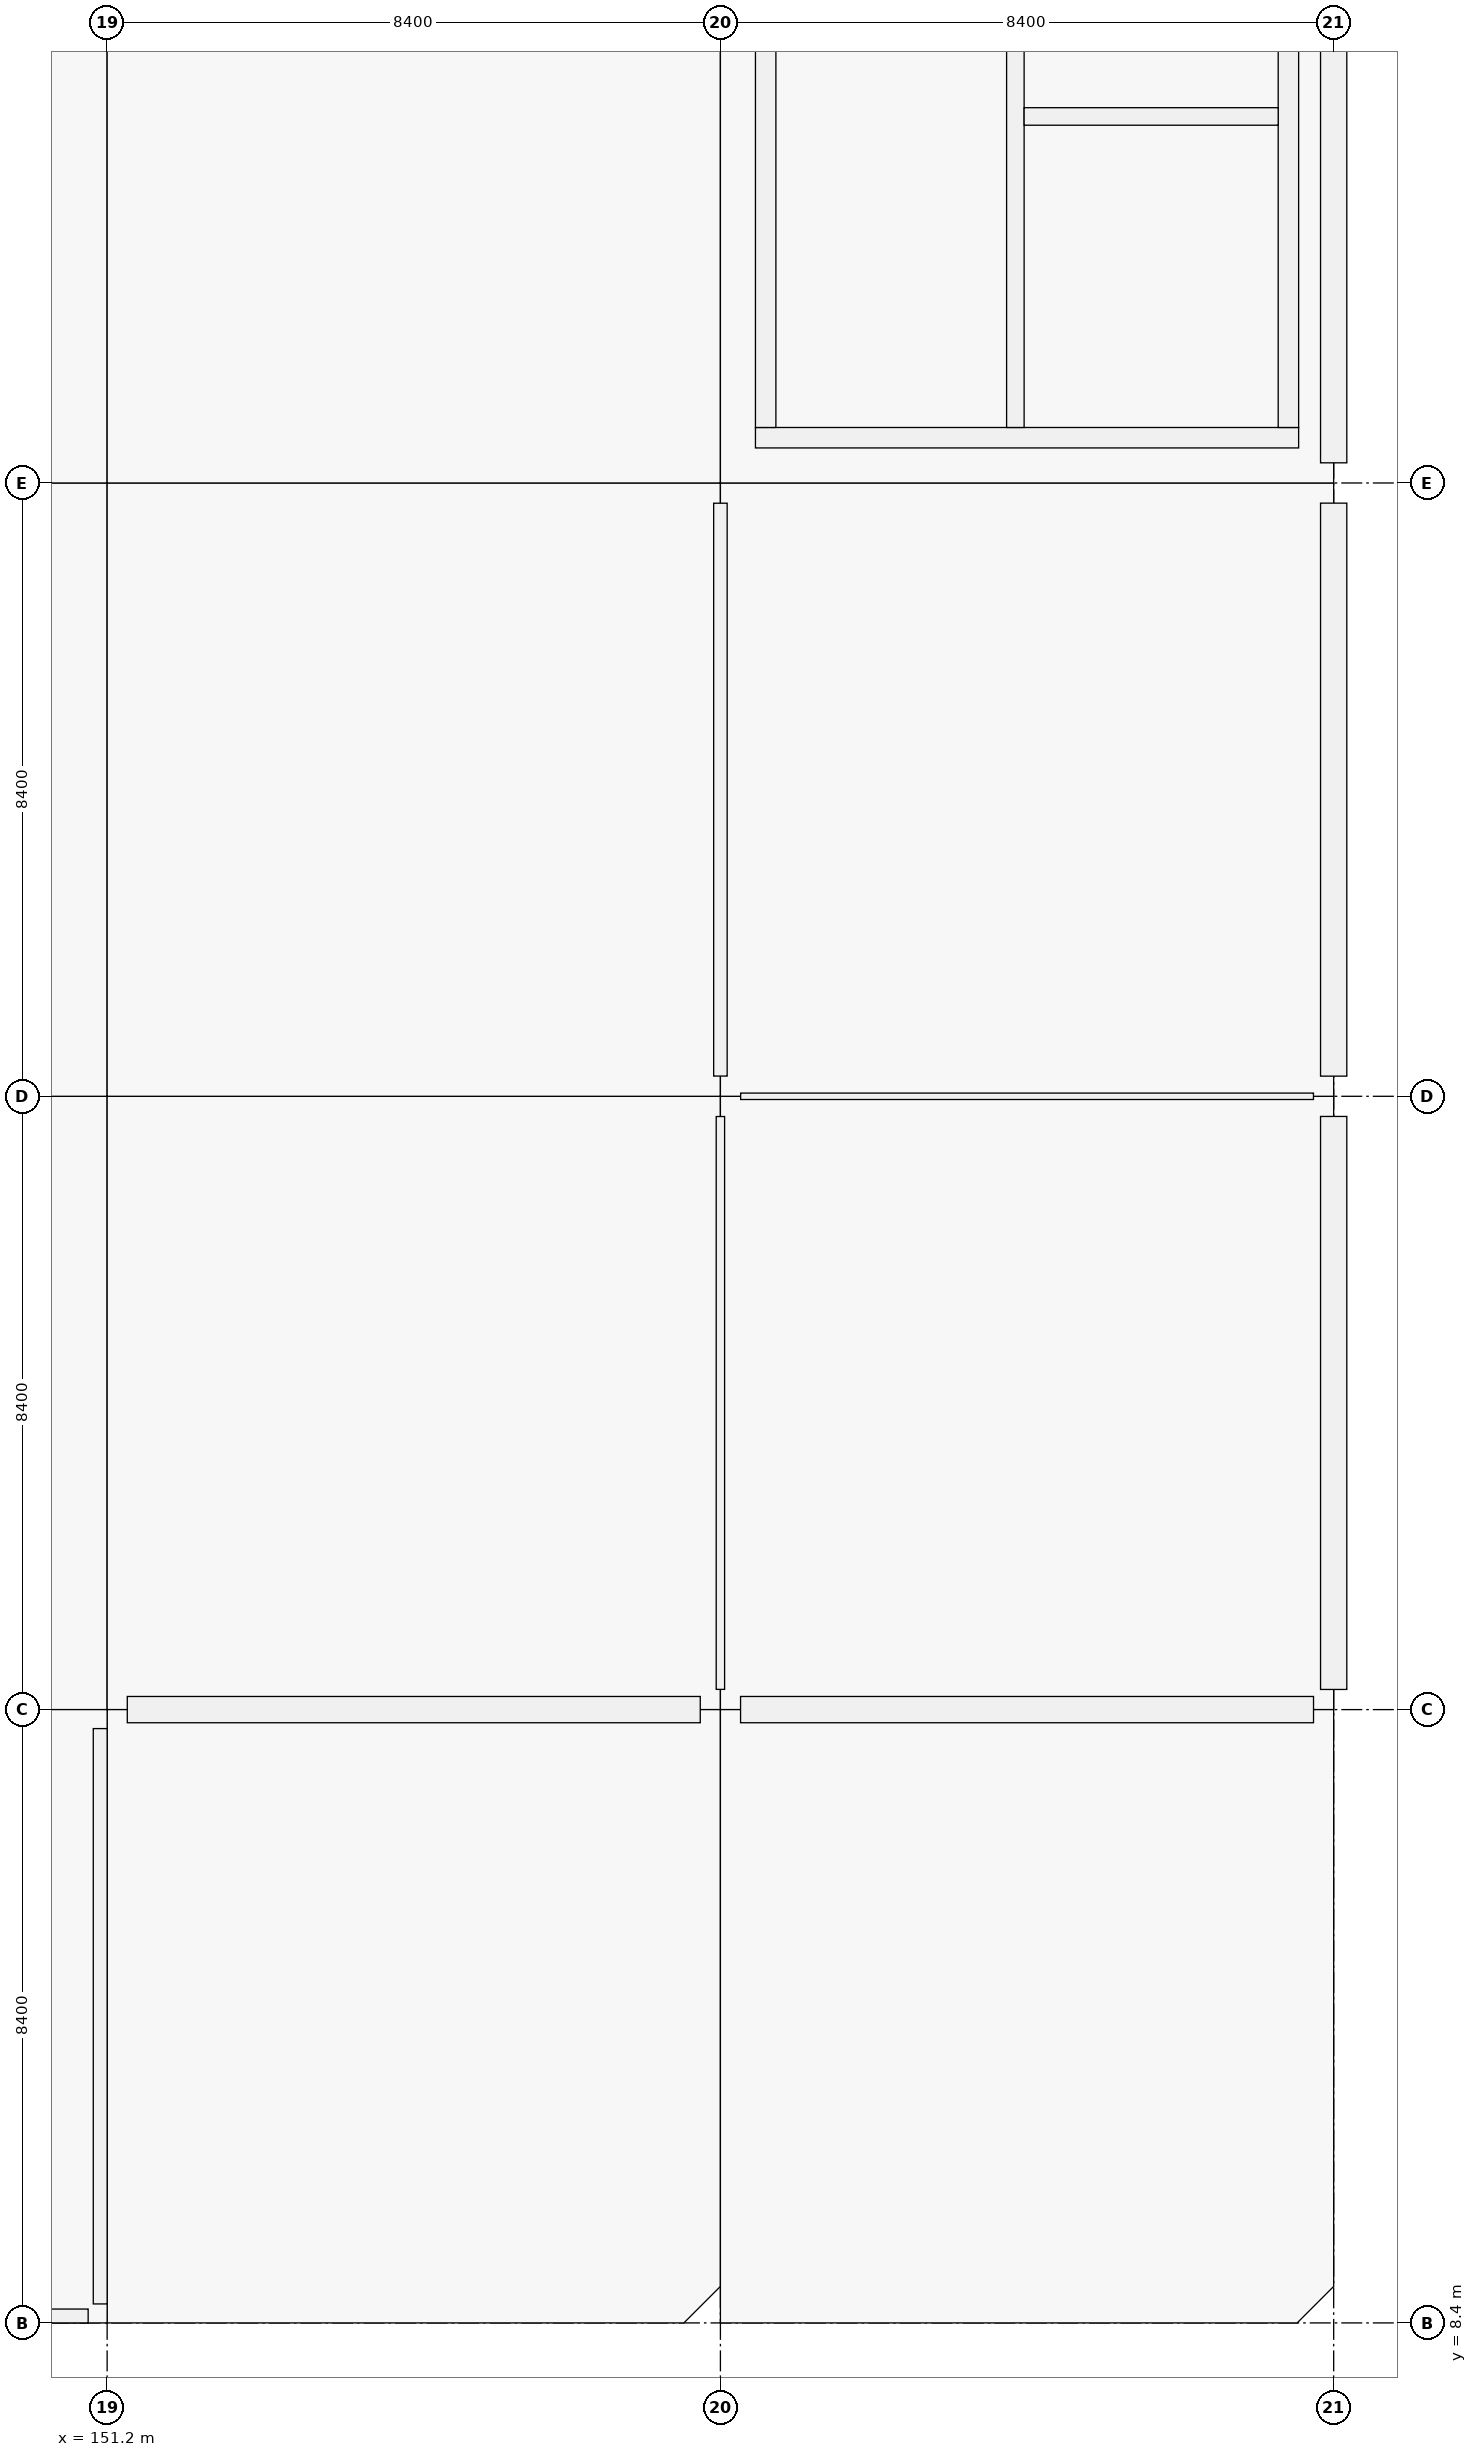
"""IFC4 building model, lengths in metres.
Left out: names, types, materials, properties, quantities, classifications, styles, units other than length and angle.
Written with IfcOpenShell. Run it as: python <this file> out.ifc"""

import sys

from ifc_helpers import new_model, si_unit, direction, frame, frame_2d, origin, origin_2d, place, context, subcontext, project, spatial, rectangle, i_section, extrude, element, fill, save


model = new_model("IFC4")
c1 = context("Model", 3, precision=1e-05, world=origin(), true_north=direction((0.0, 1.0)))
c2 = subcontext(c1, "Body", "Model", "MODEL_VIEW")
j1 = project(units=[si_unit("LENGTHUNIT", "METRE"), si_unit("PLANEANGLEUNIT", "RADIAN")], contexts=[c1])
p1 = place(None, origin())
s1 = spatial("IfcSite", under=j1, at=p1, CompositionType="ELEMENT")
p2 = place(p1, origin())
s2 = spatial("IfcBuilding", under=s1, at=p2, CompositionType="ELEMENT")
p3 = place(p2, frame((0.0, 0.0, 14.76)))
s3 = spatial("IfcBuildingStorey", under=s2, at=p3, CompositionType="ELEMENT", Elevation=14.76)
for number, where, z_axis, x_axis in (
    (1, (151.2, 16.8, 0.0), (0.0, 0.0, 1.0), (1.0, 0.0, 0.0)),
    (2, (151.2, 25.2, 0.0), (0.0, 0.0, 1.0), (1.0, 0.0, 0.0)),
    (3, (151.2, 33.6, 0.0), (0.0, 0.0, 1.0), (1.0, 0.0, 0.0)),
    (4, (159.6, 16.8, 0.0), (0.0, 0.0, 1.0), (1.0, 0.0, 0.0)),
    (5, (159.6, 25.2, 0.0), (0.0, 0.0, 1.0), (1.0, 0.0, 0.0)),
    (6, (159.6, 33.6, 0.0), (0.0, 0.0, 1.0), (1.0, 0.0, 0.0)),
    (7, (168.0, 16.8, 0.0), (0.0, 0.0, 1.0), (1.0, 0.0, 0.0)),
    (8, (168.0, 25.2, 0.0), (0.0, 0.0, 1.0), (1.0, 0.0, 0.0)),
    (9, (168.0, 33.6, 0.0), (0.0, 0.0, 1.0), (1.0, 0.0, 0.0)),
):
    element("IfcColumn", number, at=place(p3, frame(where, z_axis=z_axis, x_axis=x_axis)), inside=s3, PredefinedType="COLUMN", context=c2, shape_type="SweptSolid", body=[
        extrude(rectangle(XDim=0.55, YDim=0.55, at=origin_2d()), origin(), (0.0, 0.0, 1.0), 4.17),
    ])
for number, where, z_axis, x_axis in (
    (10, (151.2, 16.8, 4.17), (0.0, 0.0, 1.0), (1.0, 0.0, 0.0)),
    (11, (159.6, 16.8, 4.17), (0.0, 0.0, 1.0), (1.0, 0.0, 0.0)),
    (12, (167.86, 16.8, 4.17), (0.0, 0.0, 1.0), (1.0, 0.0, 0.0)),
    (13, (151.2, 25.2, 4.17), (0.0, 0.0, 1.0), (1.0, 0.0, 0.0)),
    (14, (159.6, 25.2, 4.17), (0.0, 0.0, 1.0), (1.0, 0.0, 0.0)),
    (15, (167.86, 25.2, 4.17), (0.0, 0.0, 1.0), (1.0, 0.0, 0.0)),
    (16, (151.2, 33.6, 4.17), (0.0, 0.0, 1.0), (1.0, 0.0, 0.0)),
    (17, (159.6, 33.6, 4.17), (0.0, 0.0, 1.0), (1.0, 0.0, 0.0)),
    (18, (167.86, 33.6, 4.17), (0.0, 0.0, 1.0), (1.0, 0.0, 0.0)),
):
    element("IfcColumn", number, at=place(p3, frame(where, z_axis=z_axis, x_axis=x_axis)), inside=s3, PredefinedType="COLUMN", context=c2, shape_type="SweptSolid", body=[
        extrude(i_section(OverallWidth=0.254, OverallDepth=0.254, WebThickness=0.009, FlangeThickness=0.014, FilletRadius=0.013, at=origin_2d()), origin(), (0.0, 0.0, 1.0), 2.157),
    ])
p4 = place(p3, frame((159.324, 16.8, 0.0), z_axis=(0.0, 0.0, 1.0), x_axis=(-1.0, 0.0, 0.0)))
e19 = element("IfcWall", 19, at=p4, inside=s3, PredefinedType="SOLIDWALL", context=c2, shape_type="SweptSolid", body=[
    extrude(rectangle(XDim=7.848, YDim=0.36, at=frame_2d((3.924, 0.0))), origin(), (0.0, 0.0, 1.0), 3.37),
])
p5 = place(p4, frame((2.999, 0.0, 0.0)))
e20 = element("IfcOpeningElement", 20, at=p5, cuts=e19, PredefinedType="OPENING", context=c2, shape_type="SweptSolid", body=[
    extrude(rectangle(XDim=1.85, YDim=2.2, at=frame_2d((0.925, 1.1))), frame((0.0, 0.18, 0.0), z_axis=(0.0, -1.0, 0.0), x_axis=(1.0, 0.0, 0.0)), (0.0, 0.0, 1.0), 0.36),
])
p6 = place(p3, frame((167.724, 16.8, 0.0), z_axis=(0.0, 0.0, 1.0), x_axis=(-1.0, 0.0, 0.0)))
e21 = element("IfcWall", 21, at=p6, inside=s3, PredefinedType="SOLIDWALL", context=c2, shape_type="SweptSolid", body=[
    extrude(rectangle(XDim=7.848, YDim=0.36, at=frame_2d((3.924, 0.0))), origin(), (0.0, 0.0, 1.0), 3.37),
])
p7 = place(p6, frame((3.099, 0.0, 0.0)))
e22 = element("IfcOpeningElement", 22, at=p7, cuts=e21, PredefinedType="OPENING", context=c2, shape_type="SweptSolid", body=[
    extrude(rectangle(XDim=1.65, YDim=2.2, at=frame_2d((0.825, 1.1))), frame((0.0, 0.18, 0.0), z_axis=(0.0, -1.0, 0.0), x_axis=(1.0, 0.0, 0.0)), (0.0, 0.0, 1.0), 0.36),
])
p8 = place(p3, frame((168.0, 24.924, 0.0), z_axis=(0.0, 0.0, 1.0), x_axis=(0.0, -1.0, 0.0)))
e23 = element("IfcWall", 23, at=p8, inside=s3, PredefinedType="SOLIDWALL", context=c2, shape_type="SweptSolid", body=[
    extrude(rectangle(XDim=7.848, YDim=0.36, at=frame_2d((3.924, 0.0))), origin(), (0.0, 0.0, 1.0), 3.37),
])
p9 = place(p8, frame((2.824, 0.0, 0.9)))
e24 = element("IfcOpeningElement", 24, at=p9, cuts=e23, PredefinedType="OPENING", context=c2, shape_type="SweptSolid", body=[
    extrude(rectangle(XDim=2.2, YDim=1.75, at=frame_2d((1.1, 0.875))), frame((0.0, 0.18, 0.0), z_axis=(0.0, -1.0, 0.0), x_axis=(1.0, 0.0, 0.0)), (0.0, 0.0, 1.0), 0.36),
])
p10 = place(p3, frame((168.0, 33.324, 0.0), z_axis=(0.0, 0.0, 1.0), x_axis=(0.0, -1.0, 0.0)))
e25 = element("IfcWall", 25, at=p10, inside=s3, PredefinedType="SOLIDWALL", context=c2, shape_type="SweptSolid", body=[
    extrude(rectangle(XDim=7.848, YDim=0.36, at=frame_2d((3.924, 0.0))), origin(), (0.0, 0.0, 1.0), 3.37),
])
p11 = place(p10, frame((2.524, 0.0, 0.9)))
e26 = element("IfcOpeningElement", 26, at=p11, cuts=e25, PredefinedType="OPENING", context=c2, shape_type="SweptSolid", body=[
    extrude(rectangle(XDim=2.8, YDim=1.75, at=frame_2d((1.4, 0.875))), frame((0.0, 0.18, 0.0), z_axis=(0.0, -1.0, 0.0), x_axis=(1.0, 0.0, 0.0)), (0.0, 0.0, 1.0), 0.36),
])
p12 = place(p3, frame((168.0, 41.724, 0.0), z_axis=(0.0, 0.0, 1.0), x_axis=(0.0, -1.0, 0.0)))
e27 = element("IfcWall", 27, at=p12, inside=s3, PredefinedType="SOLIDWALL", context=c2, shape_type="SweptSolid", body=[
    extrude(rectangle(XDim=7.848, YDim=0.36, at=frame_2d((3.924, 0.0))), origin(), (0.0, 0.0, 1.0), 3.37),
])
p13 = place(p3, frame((150.94, 8.495, 0.0), z_axis=(0.0, 0.0, 1.0), x_axis=(-1.0, 0.0, 0.0)))
e28 = element("IfcWall", 28, at=p13, inside=s3, PredefinedType="PARAPET", context=c2, shape_type="SweptSolid", body=[
    extrude(rectangle(XDim=7.88, YDim=0.19, at=frame_2d((3.94, 0.0))), origin(), (0.0, 0.0, 1.0), 0.95),
])
p14 = place(p3, frame((151.105, 16.54, 0.0), z_axis=(0.0, 0.0, 1.0), x_axis=(0.0, -1.0, 0.0)))
e29 = element("IfcWall", 29, at=p14, inside=s3, PredefinedType="PARAPET", context=c2, shape_type="SweptSolid", body=[
    extrude(rectangle(XDim=7.88, YDim=0.19, at=frame_2d((3.94, 0.0))), origin(), (0.0, 0.0, 1.0), 0.95),
])
p15 = place(p3, frame((167.52, 34.22, 0.0), z_axis=(0.0, 0.0, 1.0), x_axis=(-1.0, 0.0, 0.0)))
e30 = element("IfcWall", 30, at=p15, inside=s3, PredefinedType="SHEAR", context=c2, shape_type="SweptSolid", body=[
    extrude(rectangle(XDim=7.44, YDim=0.28, at=frame_2d((3.72, 0.0))), origin(), (0.0, 0.0, 1.0), 4.07),
])
p16 = place(p15, frame((1.28, 0.0, 0.0)))
e31 = element("IfcOpeningElement", 31, at=p16, cuts=e30, PredefinedType="OPENING", context=c2, shape_type="SweptSolid", body=[
    extrude(rectangle(XDim=1.5, YDim=2.15, at=frame_2d((0.75, 1.075))), frame((0.0, 0.14, 0.0), z_axis=(0.0, -1.0, 0.0), x_axis=(1.0, 0.0, 0.0)), (0.0, 0.0, 1.0), 0.28),
])
for number, where, z_axis, x_axis in (
    (32, (160.22, 34.36, 0.0), (0.0, 0.0, 1.0), (0.0, 1.0, 0.0)),
    (33, (167.38, 41.24, 0.0), (0.0, 0.0, 1.0), (0.0, -1.0, 0.0)),
):
    element("IfcWall", number, at=place(p3, frame(where, z_axis=z_axis, x_axis=x_axis)), inside=s3, PredefinedType="SHEAR", context=c2, shape_type="SweptSolid", body=[
        extrude(rectangle(XDim=6.88, YDim=0.28, at=frame_2d((3.44, 0.0))), origin(), (0.0, 0.0, 1.0), 4.07),
    ])
p17 = place(p3, frame((163.64, 34.36, 0.0), z_axis=(0.0, 0.0, 1.0), x_axis=(0.0, 1.0, 0.0)))
e34 = element("IfcWall", 34, at=p17, inside=s3, PredefinedType="SHEAR", context=c2, shape_type="SweptSolid", body=[
    extrude(rectangle(XDim=6.88, YDim=0.24, at=frame_2d((3.44, 0.0))), origin(), (0.0, 0.0, 1.0), 4.07),
])
p18 = place(p17, frame((0.12, 0.0, 0.0)))
e35 = element("IfcOpeningElement", 35, at=p18, cuts=e34, PredefinedType="OPENING", context=c2, shape_type="SweptSolid", body=[
    extrude(rectangle(XDim=1.0, YDim=2.15, at=frame_2d((0.5, 1.075))), frame((0.0, 0.12, 0.0), z_axis=(0.0, -1.0, 0.0), x_axis=(1.0, 0.0, 0.0)), (0.0, 0.0, 1.0), 0.24),
])
p19 = place(p3, frame((163.76, 38.62, 0.0), z_axis=(0.0, 0.0, 1.0), x_axis=(1.0, 0.0, 0.0)))
e36 = element("IfcWall", 36, at=p19, inside=s3, PredefinedType="SHEAR", context=c2, shape_type="SweptSolid", body=[
    extrude(rectangle(XDim=3.48, YDim=0.24, at=frame_2d((1.74, 0.0))), origin(), (0.0, 0.0, 1.0), 4.07),
])
p20 = place(p19, frame((1.09, 0.0, 0.0)))
e37 = element("IfcOpeningElement", 37, at=p20, cuts=e36, PredefinedType="OPENING", context=c2, shape_type="SweptSolid", body=[
    extrude(rectangle(XDim=1.3, YDim=2.25, at=frame_2d((0.65, 1.125))), frame((0.0, 0.12, 0.0), z_axis=(0.0, -1.0, 0.0), x_axis=(1.0, 0.0, 0.0)), (0.0, 0.0, 1.0), 0.24),
])
p21 = place(p3, frame((159.877, 25.2, 0.0), z_axis=(0.0, 0.0, 1.0), x_axis=(1.0, 0.0, 0.0)))
e38 = element("IfcWall", 38, at=p21, inside=s3, PredefinedType="PARTITIONING", context=c2, shape_type="SweptSolid", body=[
    extrude(rectangle(XDim=7.846, YDim=0.088, at=frame_2d((3.923, 0.0))), origin(), (0.0, 0.0, 1.0), 3.19),
])
p22 = place(p21, frame((3.393, 0.0, 0.0)))
e39 = element("IfcOpeningElement", 39, at=p22, cuts=e38, PredefinedType="OPENING", context=c2, shape_type="SweptSolid", body=[
    extrude(rectangle(XDim=1.06, YDim=2.25, at=frame_2d((0.53, 1.125))), frame((0.0, 0.044, 0.0), z_axis=(0.0, -1.0, 0.0), x_axis=(1.0, 0.0, 0.0)), (0.0, 0.0, 1.0), 0.088),
])
p23 = place(p3, frame((159.6, 17.077, 0.0), z_axis=(0.0, 0.0, 1.0), x_axis=(0.0, 1.0, 0.0)))
e40 = element("IfcWall", 40, at=p23, inside=s3, PredefinedType="PARTITIONING", context=c2, shape_type="SweptSolid", body=[
    extrude(rectangle(XDim=7.846, YDim=0.115, at=frame_2d((3.923, 0.0))), origin(), (0.0, 0.0, 1.0), 3.19),
])
p24 = place(p23, frame((3.453, 0.0, 0.0)))
e41 = element("IfcOpeningElement", 41, at=p24, cuts=e40, PredefinedType="OPENING", context=c2, shape_type="SweptSolid", body=[
    extrude(rectangle(XDim=0.94, YDim=2.15, at=frame_2d((0.47, 1.075))), frame((0.0, 0.058, 0.0), z_axis=(0.0, -1.0, 0.0), x_axis=(1.0, 0.0, 0.0)), (0.0, 0.0, 1.0), 0.115),
])
p25 = place(p3, frame((159.6, 25.477, 0.0), z_axis=(0.0, 0.0, 1.0), x_axis=(0.0, 1.0, 0.0)))
e42 = element("IfcWall", 42, at=p25, inside=s3, PredefinedType="PARTITIONING", context=c2, shape_type="SweptSolid", body=[
    extrude(rectangle(XDim=7.846, YDim=0.185, at=frame_2d((3.923, 0.0))), origin(), (0.0, 0.0, 1.0), 3.19),
])
p26 = place(p25, frame((3.453, 0.0, 0.0)))
e43 = element("IfcOpeningElement", 43, at=p26, cuts=e42, PredefinedType="OPENING", context=c2, shape_type="SweptSolid", body=[
    extrude(rectangle(XDim=0.94, YDim=2.15, at=frame_2d((0.47, 1.075))), frame((0.0, 0.093, 0.0), z_axis=(0.0, -1.0, 0.0), x_axis=(1.0, 0.0, 0.0)), (0.0, 0.0, 1.0), 0.185),
])
p27 = place(p5, origin())
e44 = element("IfcDoor", 44, at=p27, inside=s3, OperationType="DOUBLE_DOOR_SINGLE_SWING", PredefinedType="DOOR", context=c2, shape_type="SweptSolid", body=[
    extrude(rectangle(XDim=1.85, YDim=2.2, at=frame_2d((0.925, 1.1))), frame((0.0, 0.025, 0.0), z_axis=(0.0, -1.0, 0.0), x_axis=(1.0, 0.0, 0.0)), (0.0, 0.0, 1.0), 0.05),
])
fill(e20, e44)
p28 = place(p7, origin())
e45 = element("IfcDoor", 45, at=p28, inside=s3, OperationType="DOUBLE_DOOR_SINGLE_SWING", PredefinedType="DOOR", context=c2, shape_type="SweptSolid", body=[
    extrude(rectangle(XDim=1.65, YDim=2.2, at=frame_2d((0.825, 1.1))), frame((0.0, 0.025, 0.0), z_axis=(0.0, -1.0, 0.0), x_axis=(1.0, 0.0, 0.0)), (0.0, 0.0, 1.0), 0.05),
])
fill(e22, e45)
p29 = place(p9, origin())
e46 = element("IfcWindow", 46, at=p29, inside=s3, PartitioningType="SINGLE_PANEL", PredefinedType="WINDOW", context=c2, shape_type="SweptSolid", body=[
    extrude(rectangle(XDim=2.2, YDim=1.75, at=frame_2d((1.1, 0.875))), frame((0.0, 0.03, 0.0), z_axis=(0.0, -1.0, 0.0), x_axis=(1.0, 0.0, 0.0)), (0.0, 0.0, 1.0), 0.06),
])
fill(e24, e46)
p30 = place(p11, origin())
e47 = element("IfcWindow", 47, at=p30, inside=s3, PartitioningType="SINGLE_PANEL", PredefinedType="WINDOW", context=c2, shape_type="SweptSolid", body=[
    extrude(rectangle(XDim=2.8, YDim=1.75, at=frame_2d((1.4, 0.875))), frame((0.0, 0.03, 0.0), z_axis=(0.0, -1.0, 0.0), x_axis=(1.0, 0.0, 0.0)), (0.0, 0.0, 1.0), 0.06),
])
fill(e26, e47)
p31 = place(p18, origin())
e48 = element("IfcDoor", 48, at=p31, inside=s3, OperationType="SINGLE_SWING_RIGHT", PredefinedType="DOOR", context=c2, shape_type="SweptSolid", body=[
    extrude(rectangle(XDim=1.0, YDim=2.15, at=frame_2d((0.5, 1.075))), frame((0.0, 0.025, 0.0), z_axis=(0.0, -1.0, 0.0), x_axis=(1.0, 0.0, 0.0)), (0.0, 0.0, 1.0), 0.05),
])
fill(e35, e48)
p32 = place(p16, origin())
e49 = element("IfcDoor", 49, at=p32, inside=s3, OperationType="DOUBLE_DOOR_SINGLE_SWING", PredefinedType="DOOR", context=c2, shape_type="SweptSolid", body=[
    extrude(rectangle(XDim=1.5, YDim=2.15, at=frame_2d((0.75, 1.075))), frame((0.0, 0.025, 0.0), z_axis=(0.0, -1.0, 0.0), x_axis=(1.0, 0.0, 0.0)), (0.0, 0.0, 1.0), 0.05),
])
fill(e31, e49)
p33 = place(p20, origin())
e50 = element("IfcDoor", 50, at=p33, inside=s3, OperationType="DOUBLE_DOOR_SLIDING", PredefinedType="DOOR", context=c2, shape_type="SweptSolid", body=[
    extrude(rectangle(XDim=1.3, YDim=2.25, at=frame_2d((0.65, 1.125))), frame((0.0, 0.025, 0.0), z_axis=(0.0, -1.0, 0.0), x_axis=(1.0, 0.0, 0.0)), (0.0, 0.0, 1.0), 0.05),
])
fill(e37, e50)
p34 = place(p22, origin())
e51 = element("IfcDoor", 51, at=p34, inside=s3, OperationType="SINGLE_SWING_RIGHT", PredefinedType="DOOR", context=c2, shape_type="SweptSolid", body=[
    extrude(rectangle(XDim=1.06, YDim=2.25, at=frame_2d((0.53, 1.125))), frame((0.0, 0.025, 0.0), z_axis=(0.0, -1.0, 0.0), x_axis=(1.0, 0.0, 0.0)), (0.0, 0.0, 1.0), 0.05),
])
fill(e39, e51)
p35 = place(p26, origin())
e52 = element("IfcDoor", 52, at=p35, inside=s3, OperationType="SINGLE_SWING_RIGHT", PredefinedType="DOOR", context=c2, shape_type="SweptSolid", body=[
    extrude(rectangle(XDim=0.94, YDim=2.15, at=frame_2d((0.47, 1.075))), frame((0.0, 0.025, 0.0), z_axis=(0.0, -1.0, 0.0), x_axis=(1.0, 0.0, 0.0)), (0.0, 0.0, 1.0), 0.05),
])
fill(e43, e52)
p36 = place(p24, origin())
e53 = element("IfcDoor", 53, at=p36, inside=s3, OperationType="SINGLE_SWING_LEFT", PredefinedType="DOOR", context=c2, shape_type="SweptSolid", body=[
    extrude(rectangle(XDim=0.94, YDim=2.15, at=frame_2d((0.47, 1.075))), frame((0.0, 0.025, 0.0), z_axis=(0.0, -1.0, 0.0), x_axis=(1.0, 0.0, 0.0)), (0.0, 0.0, 1.0), 0.05),
])
fill(e41, e53)
save(model, sys.argv[1])
